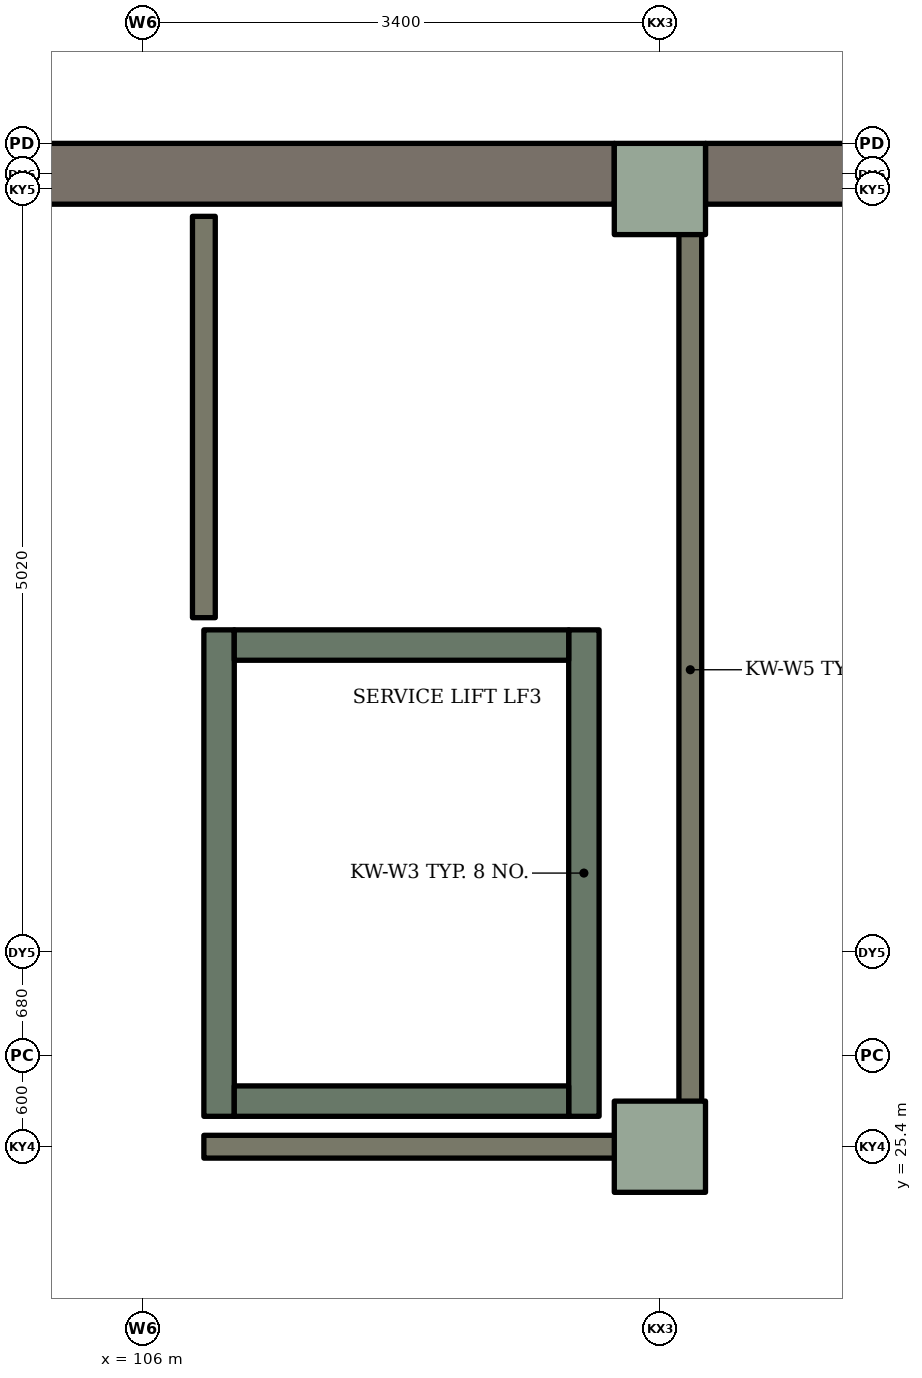
"""IFC4 building model, lengths in metres.
Left out: names, types, materials, properties, quantities, classifications, styles, units other than length and angle.
Written with IfcOpenShell. Run it as: python <this file> out.ifc"""

import sys

from ifc_helpers import new_model, si_unit, direction, frame, frame_2d, origin, origin_2d, place, context, subcontext, project, spatial, rectangle, extrude, element, fill, save


model = new_model("IFC4")
c1 = context("Model", 3, precision=1e-05, world=origin(), true_north=direction((0.0, 1.0)))
c2 = subcontext(c1, "Body", "Model", "MODEL_VIEW")
j1 = project(units=[si_unit("LENGTHUNIT", "METRE"), si_unit("PLANEANGLEUNIT", "RADIAN")], contexts=[c1])
p1 = place(None, origin())
s1 = spatial("IfcSite", under=j1, at=p1, CompositionType="ELEMENT")
p2 = place(p1, origin())
s2 = spatial("IfcBuilding", under=s1, at=p2, CompositionType="ELEMENT")
p3 = place(p2, frame((0.0, 0.0, 4.2)))
s3 = spatial("IfcBuildingStorey", under=s2, at=p3, CompositionType="ELEMENT", Elevation=4.2)
for number, where, z_axis, x_axis in (
    (1, (109.4, 25.4, 0.0), (0.0, 0.0, 1.0), (1.0, 0.0, 0.0)),
    (2, (109.4, 31.7, 0.0), (0.0, 0.0, 1.0), (1.0, 0.0, 0.0)),
):
    element("IfcColumn", number, at=place(p3, frame(where, z_axis=z_axis, x_axis=x_axis)), inside=s3, PredefinedType="COLUMN", context=c2, shape_type="SweptSolid", body=[
        extrude(rectangle(XDim=0.6, YDim=0.6, at=origin_2d()), origin(), (0.0, 0.0, 1.0), 4.2),
    ])
p4 = place(p3, frame((103.3, 31.8, 0.0), z_axis=(0.0, 0.0, 1.0), x_axis=(1.0, 0.0, 0.0)))
e3 = element("IfcWall", 3, at=p4, inside=s3, PredefinedType="SOLIDWALL", context=c2, shape_type="SweptSolid", body=[
    extrude(rectangle(XDim=5.8, YDim=0.4, at=frame_2d((2.9, 0.0))), origin(), (0.0, 0.0, 1.0), 4.2),
])
p5 = place(p4, frame((1.7, 0.0, 0.9)))
e4 = element("IfcOpeningElement", 4, at=p5, cuts=e3, PredefinedType="OPENING", context=c2, shape_type="SweptSolid", body=[
    extrude(rectangle(XDim=2.4, YDim=2.7, at=frame_2d((1.2, 1.35))), frame((0.0, 0.21, 0.0), z_axis=(0.0, -1.0, 0.0), x_axis=(1.0, 0.0, 0.0)), (0.0, 0.0, 1.0), 0.42),
])
p6 = place(p3, frame((109.7, 31.8, 0.0), z_axis=(0.0, 0.0, 1.0), x_axis=(1.0, 0.0, 0.0)))
e5 = element("IfcWall", 5, at=p6, inside=s3, PredefinedType="SOLIDWALL", context=c2, shape_type="SweptSolid", body=[
    extrude(rectangle(XDim=5.7, YDim=0.4, at=frame_2d((2.85, 0.0))), origin(), (0.0, 0.0, 1.0), 4.2),
])
p7 = place(p6, frame((1.65, 0.0, 0.9)))
e6 = element("IfcOpeningElement", 6, at=p7, cuts=e5, PredefinedType="OPENING", context=c2, shape_type="SweptSolid", body=[
    extrude(rectangle(XDim=2.4, YDim=2.7, at=frame_2d((1.2, 1.35))), frame((0.0, 0.21, 0.0), z_axis=(0.0, -1.0, 0.0), x_axis=(1.0, 0.0, 0.0)), (0.0, 0.0, 1.0), 0.42),
])
for number, where, z_axis, x_axis in (
    (7, (106.5, 25.6, 0.0), (0.0, 0.0, 1.0), (0.0, 1.0, 0.0)),
    (8, (108.9, 25.6, 0.0), (0.0, 0.0, 1.0), (0.0, 1.0, 0.0)),
):
    element("IfcWall", number, at=place(p3, frame(where, z_axis=z_axis, x_axis=x_axis)), inside=s3, PredefinedType="SHEAR", context=c2, shape_type="SweptSolid", body=[
        extrude(rectangle(XDim=3.2, YDim=0.2, at=frame_2d((1.6, 0.0))), origin(), (0.0, 0.0, 1.0), 4.2),
    ])
p8 = place(p3, frame((106.6, 25.7, 0.0), z_axis=(0.0, 0.0, 1.0), x_axis=(1.0, 0.0, 0.0)))
e9 = element("IfcWall", 9, at=p8, inside=s3, PredefinedType="SHEAR", context=c2, shape_type="SweptSolid", body=[
    extrude(rectangle(XDim=2.2, YDim=0.2, at=frame_2d((1.1, 0.0))), origin(), (0.0, 0.0, 1.0), 4.2),
])
p9 = place(p3, frame((106.6, 28.7, 0.0), z_axis=(0.0, 0.0, 1.0), x_axis=(1.0, 0.0, 0.0)))
e10 = element("IfcWall", 10, at=p9, inside=s3, PredefinedType="SHEAR", context=c2, shape_type="SweptSolid", body=[
    extrude(rectangle(XDim=2.2, YDim=0.2, at=frame_2d((1.1, 0.0))), origin(), (0.0, 0.0, 1.0), 4.2),
])
p10 = place(p9, frame((0.55, 0.0, 0.0)))
e11 = element("IfcOpeningElement", 11, at=p10, cuts=e10, PredefinedType="OPENING", context=c2, shape_type="SweptSolid", body=[
    extrude(rectangle(XDim=1.1, YDim=2.1, at=frame_2d((0.55, 1.05))), frame((0.0, 0.11, 0.0), z_axis=(0.0, -1.0, 0.0), x_axis=(1.0, 0.0, 0.0)), (0.0, 0.0, 1.0), 0.22),
])
p11 = place(p3, frame((106.4, 25.4, 0.0), z_axis=(0.0, 0.0, 1.0), x_axis=(1.0, 0.0, 0.0)))
e12 = element("IfcWall", 12, at=p11, inside=s3, PredefinedType="PARTITIONING", context=c2, shape_type="SweptSolid", body=[
    extrude(rectangle(XDim=3.2, YDim=0.15, at=frame_2d((1.6, 0.0))), origin(), (0.0, 0.0, 1.0), 3.92),
])
p12 = place(p3, frame((106.4, 31.52, 0.0), z_axis=(0.0, 0.0, 1.0), x_axis=(0.0, -1.0, 0.0)))
e13 = element("IfcWall", 13, at=p12, inside=s3, PredefinedType="PARTITIONING", context=c2, shape_type="SweptSolid", body=[
    extrude(rectangle(XDim=2.64, YDim=0.15, at=frame_2d((1.32, 0.0))), origin(), (0.0, 0.0, 1.0), 3.92),
])
p13 = place(p3, frame((109.525, 31.6, 0.0), z_axis=(0.0, 0.0, 1.0), x_axis=(-1.0, 0.0, 0.0)))
e14 = element("IfcWall", 14, at=p13, inside=s3, PredefinedType="PARTITIONING", context=c2, shape_type="SweptSolid", body=[
    extrude(rectangle(XDim=0.345, YDim=0.15, at=frame_2d((0.172, 0.0))), origin(), (0.0, 0.0, 1.0), 3.92),
])
p14 = place(p3, frame((109.6, 25.475, 0.0), z_axis=(0.0, 0.0, 1.0), x_axis=(0.0, 1.0, 0.0)))
e15 = element("IfcWall", 15, at=p14, inside=s3, PredefinedType="PARTITIONING", context=c2, shape_type="SweptSolid", body=[
    extrude(rectangle(XDim=6.125, YDim=0.15, at=frame_2d((3.062, 0.0))), origin(), (0.0, 0.0, 1.0), 3.92),
])
p15 = place(p5, origin())
e16 = element("IfcWindow", 16, at=p15, inside=s3, PartitioningType="SINGLE_PANEL", PredefinedType="WINDOW", context=c2, shape_type="SweptSolid", body=[
    extrude(rectangle(XDim=2.4, YDim=2.7, at=frame_2d((1.2, 1.35))), frame((0.0, 0.03, 0.0), z_axis=(0.0, -1.0, 0.0), x_axis=(1.0, 0.0, 0.0)), (0.0, 0.0, 1.0), 0.06),
])
fill(e4, e16)
p16 = place(p10, origin())
e17 = element("IfcDoor", 17, at=p16, inside=s3, OperationType="SLIDING_TO_LEFT", PredefinedType="DOOR", context=c2, shape_type="SweptSolid", body=[
    extrude(rectangle(XDim=1.1, YDim=2.1, at=frame_2d((0.55, 1.05))), frame((0.0, 0.025, 0.0), z_axis=(0.0, -1.0, 0.0), x_axis=(1.0, 0.0, 0.0)), (0.0, 0.0, 1.0), 0.05),
])
fill(e11, e17)
save(model, sys.argv[1])
